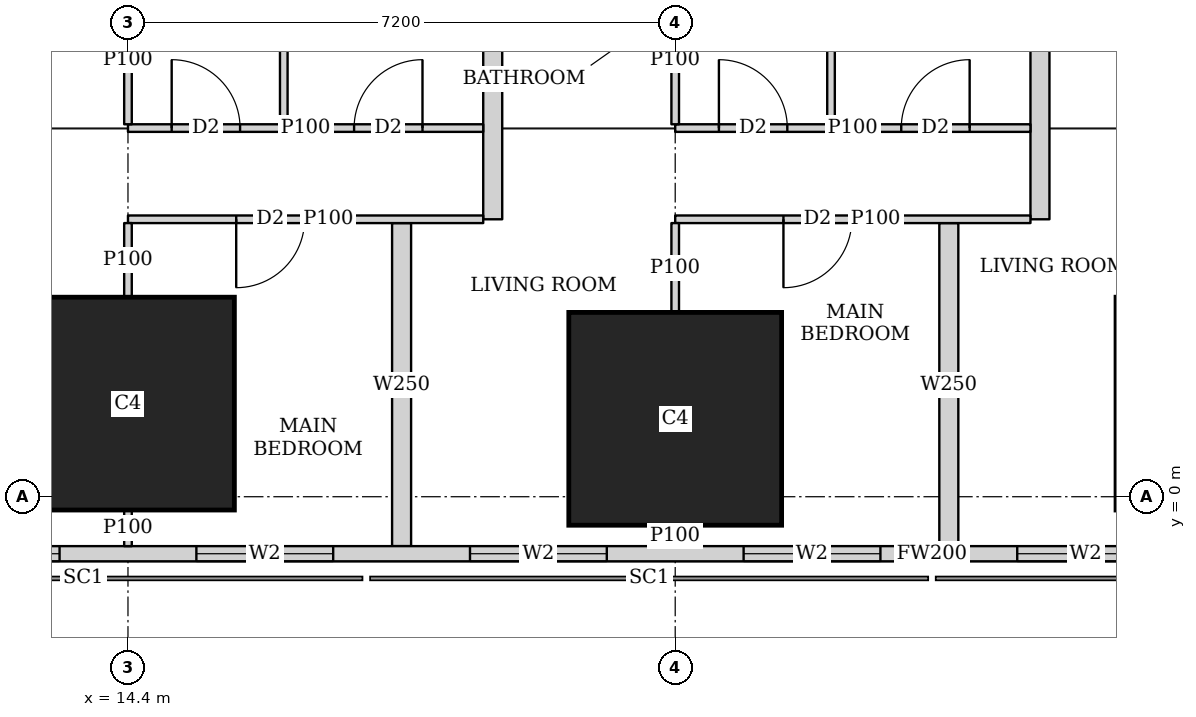
"""IFC4 building model, lengths in metres.
Left out: names, types, materials, properties, quantities, classifications, styles, units other than length and angle.
Written with IfcOpenShell. Run it as: python <this file> out.ifc"""

import sys

from ifc_helpers import new_model, si_unit, direction, frame, frame_2d, origin, origin_2d, place, context, subcontext, project, spatial, rectangle, extrude, element, fill, save


model = new_model("IFC4")
c1 = context("Model", 3, precision=1e-05, world=origin(), true_north=direction((0.0, 1.0)))
c2 = subcontext(c1, "Body", "Model", "MODEL_VIEW")
j1 = project(units=[si_unit("LENGTHUNIT", "METRE"), si_unit("PLANEANGLEUNIT", "RADIAN")], contexts=[c1])
p1 = place(None, origin())
s1 = spatial("IfcSite", under=j1, at=p1, CompositionType="ELEMENT")
p2 = place(p1, origin())
s2 = spatial("IfcBuilding", under=s1, at=p2, CompositionType="ELEMENT")
p3 = place(p2, frame((0.0, 0.0, 68.75)))
s3 = spatial("IfcBuildingStorey", under=s2, at=p3, CompositionType="ELEMENT", Elevation=68.75)
for number, where, z_axis, x_axis in (
    (1, (14.4, 1.225, 0.0), (0.0, 0.0, 1.0), (1.0, 0.0, 0.0)),
    (2, (21.6, 1.025, 0.0), (0.0, 0.0, 1.0), (1.0, 0.0, 0.0)),
):
    element("IfcColumn", number, at=place(p3, frame(where, z_axis=z_axis, x_axis=x_axis)), inside=s3, PredefinedType="COLUMN", context=c2, shape_type="SweptSolid", body=[
        extrude(rectangle(XDim=2.8, YDim=2.8, at=origin_2d()), origin(), (0.0, 0.0, 1.0), 3.75),
    ])
p4 = place(p3, frame((2.163, -0.75, 0.0), z_axis=(0.0, 0.0, 1.0), x_axis=(1.0, 0.0, 0.0)))
e3 = element("IfcWall", 3, at=p4, inside=s3, PredefinedType="SOLIDWALL", context=c2, shape_type="SweptSolid", body=[
    extrude(rectangle(XDim=45.628, YDim=0.2, at=frame_2d((22.814, 0.0))), origin(), (0.0, 0.0, 1.0), 3.45),
])
p5 = place(p4, frame((9.537, 0.0, 0.9)))
e4 = element("IfcOpeningElement", 4, at=p5, cuts=e3, PredefinedType="OPENING", context=c2, shape_type="SweptSolid", body=[
    extrude(rectangle(XDim=1.8, YDim=1.5, at=frame_2d((0.9, 0.75))), frame((0.0, 0.11, 0.0), z_axis=(0.0, -1.0, 0.0), x_axis=(1.0, 0.0, 0.0)), (0.0, 0.0, 1.0), 0.22),
])
p6 = place(p4, frame((13.137, 0.0, 0.9)))
e5 = element("IfcOpeningElement", 5, at=p6, cuts=e3, PredefinedType="OPENING", context=c2, shape_type="SweptSolid", body=[
    extrude(rectangle(XDim=1.8, YDim=1.5, at=frame_2d((0.9, 0.75))), frame((0.0, 0.11, 0.0), z_axis=(0.0, -1.0, 0.0), x_axis=(1.0, 0.0, 0.0)), (0.0, 0.0, 1.0), 0.22),
])
p7 = place(p4, frame((16.737, 0.0, 0.9)))
e6 = element("IfcOpeningElement", 6, at=p7, cuts=e3, PredefinedType="OPENING", context=c2, shape_type="SweptSolid", body=[
    extrude(rectangle(XDim=1.8, YDim=1.5, at=frame_2d((0.9, 0.75))), frame((0.0, 0.11, 0.0), z_axis=(0.0, -1.0, 0.0), x_axis=(1.0, 0.0, 0.0)), (0.0, 0.0, 1.0), 0.22),
])
p8 = place(p4, frame((20.337, 0.0, 0.9)))
e7 = element("IfcOpeningElement", 7, at=p8, cuts=e3, PredefinedType="OPENING", context=c2, shape_type="SweptSolid", body=[
    extrude(rectangle(XDim=1.8, YDim=1.5, at=frame_2d((0.9, 0.75))), frame((0.0, 0.11, 0.0), z_axis=(0.0, -1.0, 0.0), x_axis=(1.0, 0.0, 0.0)), (0.0, 0.0, 1.0), 0.22),
])
p9 = place(p4, frame((23.937, 0.0, 0.9)))
e8 = element("IfcOpeningElement", 8, at=p9, cuts=e3, PredefinedType="OPENING", context=c2, shape_type="SweptSolid", body=[
    extrude(rectangle(XDim=1.8, YDim=1.5, at=frame_2d((0.9, 0.75))), frame((0.0, 0.11, 0.0), z_axis=(0.0, -1.0, 0.0), x_axis=(1.0, 0.0, 0.0)), (0.0, 0.0, 1.0), 0.22),
])
p10 = place(p4, frame((27.537, 0.0, 0.9)))
e9 = element("IfcOpeningElement", 9, at=p10, cuts=e3, PredefinedType="OPENING", context=c2, shape_type="SweptSolid", body=[
    extrude(rectangle(XDim=1.8, YDim=1.5, at=frame_2d((0.9, 0.75))), frame((0.0, 0.11, 0.0), z_axis=(0.0, -1.0, 0.0), x_axis=(1.0, 0.0, 0.0)), (0.0, 0.0, 1.0), 0.22),
])
p11 = place(p4, frame((31.137, 0.0, 0.9)))
e10 = element("IfcOpeningElement", 10, at=p11, cuts=e3, PredefinedType="OPENING", context=c2, shape_type="SweptSolid", body=[
    extrude(rectangle(XDim=1.8, YDim=1.5, at=frame_2d((0.9, 0.75))), frame((0.0, 0.11, 0.0), z_axis=(0.0, -1.0, 0.0), x_axis=(1.0, 0.0, 0.0)), (0.0, 0.0, 1.0), 0.22),
])
p12 = place(p4, frame((34.737, 0.0, 0.9)))
e11 = element("IfcOpeningElement", 11, at=p12, cuts=e3, PredefinedType="OPENING", context=c2, shape_type="SweptSolid", body=[
    extrude(rectangle(XDim=1.8, YDim=1.5, at=frame_2d((0.9, 0.75))), frame((0.0, 0.11, 0.0), z_axis=(0.0, -1.0, 0.0), x_axis=(1.0, 0.0, 0.0)), (0.0, 0.0, 1.0), 0.22),
])
p13 = place(p3, frame((19.074, 3.65, 0.0), z_axis=(0.0, 0.0, 1.0), x_axis=(-1.0, 0.0, 0.0)))
e12 = element("IfcWall", 12, at=p13, inside=s3, PredefinedType="PARTITIONING", context=c2, shape_type="SweptSolid", body=[
    extrude(rectangle(XDim=4.674, YDim=0.1, at=frame_2d((2.337, 0.0))), origin(), (0.0, 0.0, 1.0), 3.45),
])
p14 = place(p13, frame((2.35, 0.0, 0.0)))
e13 = element("IfcOpeningElement", 13, at=p14, cuts=e12, PredefinedType="OPENING", context=c2, shape_type="SweptSolid", body=[
    extrude(rectangle(XDim=0.9, YDim=2.1, at=frame_2d((0.45, 1.05))), frame((0.0, 0.06, 0.0), z_axis=(0.0, -1.0, 0.0), x_axis=(1.0, 0.0, 0.0)), (0.0, 0.0, 1.0), 0.12),
])
p15 = place(p3, frame((19.074, 4.85, 0.0), z_axis=(0.0, 0.0, 1.0), x_axis=(-1.0, 0.0, 0.0)))
e14 = element("IfcWall", 14, at=p15, inside=s3, PredefinedType="PARTITIONING", context=c2, shape_type="SweptSolid", body=[
    extrude(rectangle(XDim=4.674, YDim=0.1, at=frame_2d((2.337, 0.0))), origin(), (0.0, 0.0, 1.0), 3.45),
])
p16 = place(p15, frame((3.199, 0.0, 0.0)))
e15 = element("IfcOpeningElement", 15, at=p16, cuts=e14, PredefinedType="OPENING", context=c2, shape_type="SweptSolid", body=[
    extrude(rectangle(XDim=0.9, YDim=2.1, at=frame_2d((0.45, 1.05))), frame((0.0, 0.06, 0.0), z_axis=(0.0, -1.0, 0.0), x_axis=(1.0, 0.0, 0.0)), (0.0, 0.0, 1.0), 0.12),
])
p17 = place(p15, frame((0.799, 0.0, 0.0)))
e16 = element("IfcOpeningElement", 16, at=p17, cuts=e14, PredefinedType="OPENING", context=c2, shape_type="SweptSolid", body=[
    extrude(rectangle(XDim=0.9, YDim=2.1, at=frame_2d((0.45, 1.05))), frame((0.0, 0.06, 0.0), z_axis=(0.0, -1.0, 0.0), x_axis=(1.0, 0.0, 0.0)), (0.0, 0.0, 1.0), 0.12),
])
p18 = place(p3, frame((14.4, -0.65, 0.0), z_axis=(0.0, 0.0, 1.0), x_axis=(0.0, 1.0, 0.0)))
e17 = element("IfcWall", 17, at=p18, inside=s3, PredefinedType="PARTITIONING", context=c2, shape_type="SweptSolid", body=[
    extrude(rectangle(XDim=0.474, YDim=0.1, at=frame_2d((0.237, 0.0))), origin(), (0.0, 0.0, 1.0), 3.45),
])
p19 = place(p3, frame((14.4, 2.626, 0.0), z_axis=(0.0, 0.0, 1.0), x_axis=(0.0, 1.0, 0.0)))
e18 = element("IfcWall", 18, at=p19, inside=s3, PredefinedType="PARTITIONING", context=c2, shape_type="SweptSolid", body=[
    extrude(rectangle(XDim=0.974, YDim=0.1, at=frame_2d((0.487, 0.0))), origin(), (0.0, 0.0, 1.0), 3.45),
])
p20 = place(p3, frame((14.4, 4.9, 0.0), z_axis=(0.0, 0.0, 1.0), x_axis=(0.0, 1.0, 0.0)))
e19 = element("IfcWall", 19, at=p20, inside=s3, PredefinedType="PARTITIONING", context=c2, shape_type="SweptSolid", body=[
    extrude(rectangle(XDim=1.699, YDim=0.1, at=frame_2d((0.85, 0.0))), origin(), (0.0, 0.0, 1.0), 3.45),
])
p21 = place(p3, frame((16.45, 4.9, 0.0), z_axis=(0.0, 0.0, 1.0), x_axis=(0.0, 1.0, 0.0)))
e20 = element("IfcWall", 20, at=p21, inside=s3, PredefinedType="PARTITIONING", context=c2, shape_type="SweptSolid", body=[
    extrude(rectangle(XDim=3.525, YDim=0.1, at=frame_2d((1.763, 0.0))), origin(), (0.0, 0.0, 1.0), 3.45),
])
p22 = place(p3, frame((26.274, 3.65, 0.0), z_axis=(0.0, 0.0, 1.0), x_axis=(-1.0, 0.0, 0.0)))
e21 = element("IfcWall", 21, at=p22, inside=s3, PredefinedType="PARTITIONING", context=c2, shape_type="SweptSolid", body=[
    extrude(rectangle(XDim=4.674, YDim=0.1, at=frame_2d((2.337, 0.0))), origin(), (0.0, 0.0, 1.0), 3.45),
])
p23 = place(p22, frame((2.35, 0.0, 0.0)))
e22 = element("IfcOpeningElement", 22, at=p23, cuts=e21, PredefinedType="OPENING", context=c2, shape_type="SweptSolid", body=[
    extrude(rectangle(XDim=0.9, YDim=2.1, at=frame_2d((0.45, 1.05))), frame((0.0, 0.06, 0.0), z_axis=(0.0, -1.0, 0.0), x_axis=(1.0, 0.0, 0.0)), (0.0, 0.0, 1.0), 0.12),
])
p24 = place(p3, frame((26.274, 4.85, 0.0), z_axis=(0.0, 0.0, 1.0), x_axis=(-1.0, 0.0, 0.0)))
e23 = element("IfcWall", 23, at=p24, inside=s3, PredefinedType="PARTITIONING", context=c2, shape_type="SweptSolid", body=[
    extrude(rectangle(XDim=4.674, YDim=0.1, at=frame_2d((2.337, 0.0))), origin(), (0.0, 0.0, 1.0), 3.45),
])
p25 = place(p24, frame((3.199, 0.0, 0.0)))
e24 = element("IfcOpeningElement", 24, at=p25, cuts=e23, PredefinedType="OPENING", context=c2, shape_type="SweptSolid", body=[
    extrude(rectangle(XDim=0.9, YDim=2.1, at=frame_2d((0.45, 1.05))), frame((0.0, 0.06, 0.0), z_axis=(0.0, -1.0, 0.0), x_axis=(1.0, 0.0, 0.0)), (0.0, 0.0, 1.0), 0.12),
])
p26 = place(p24, frame((0.8, 0.0, 0.0)))
e25 = element("IfcOpeningElement", 25, at=p26, cuts=e23, PredefinedType="OPENING", context=c2, shape_type="SweptSolid", body=[
    extrude(rectangle(XDim=0.9, YDim=2.1, at=frame_2d((0.45, 1.05))), frame((0.0, 0.06, 0.0), z_axis=(0.0, -1.0, 0.0), x_axis=(1.0, 0.0, 0.0)), (0.0, 0.0, 1.0), 0.12),
])
p27 = place(p3, frame((21.6, -0.65, 0.0), z_axis=(0.0, 0.0, 1.0), x_axis=(0.0, 1.0, 0.0)))
e26 = element("IfcWall", 26, at=p27, inside=s3, PredefinedType="PARTITIONING", context=c2, shape_type="SweptSolid", body=[
    extrude(rectangle(XDim=0.274, YDim=0.1, at=frame_2d((0.137, 0.0))), origin(), (0.0, 0.0, 1.0), 3.45),
])
p28 = place(p3, frame((21.6, 2.426, 0.0), z_axis=(0.0, 0.0, 1.0), x_axis=(0.0, 1.0, 0.0)))
e27 = element("IfcWall", 27, at=p28, inside=s3, PredefinedType="PARTITIONING", context=c2, shape_type="SweptSolid", body=[
    extrude(rectangle(XDim=1.174, YDim=0.1, at=frame_2d((0.587, 0.0))), origin(), (0.0, 0.0, 1.0), 3.45),
])
p29 = place(p3, frame((21.6, 4.9, 0.0), z_axis=(0.0, 0.0, 1.0), x_axis=(0.0, 1.0, 0.0)))
e28 = element("IfcWall", 28, at=p29, inside=s3, PredefinedType="PARTITIONING", context=c2, shape_type="SweptSolid", body=[
    extrude(rectangle(XDim=1.699, YDim=0.1, at=frame_2d((0.85, 0.0))), origin(), (0.0, 0.0, 1.0), 3.45),
])
p30 = place(p3, frame((23.65, 4.9, 0.0), z_axis=(0.0, 0.0, 1.0), x_axis=(0.0, 1.0, 0.0)))
e29 = element("IfcWall", 29, at=p30, inside=s3, PredefinedType="PARTITIONING", context=c2, shape_type="SweptSolid", body=[
    extrude(rectangle(XDim=3.525, YDim=0.1, at=frame_2d((1.763, 0.0))), origin(), (0.0, 0.0, 1.0), 3.45),
])
p31 = place(p3, frame((18.0, -0.65, 0.0), z_axis=(0.0, 0.0, 1.0), x_axis=(0.0, 1.0, 0.0)))
e30 = element("IfcWall", 30, at=p31, inside=s3, PredefinedType="SOLIDWALL", context=c2, shape_type="SweptSolid", body=[
    extrude(rectangle(XDim=4.25, YDim=0.25, at=frame_2d((2.125, 0.0))), origin(), (0.0, 0.0, 1.0), 2.0),
])
p32 = place(p3, frame((19.199, 3.65, 0.0), z_axis=(0.0, 0.0, 1.0), x_axis=(0.0, 1.0, 0.0)))
e31 = element("IfcWall", 31, at=p32, inside=s3, PredefinedType="SOLIDWALL", context=c2, shape_type="SweptSolid", body=[
    extrude(rectangle(XDim=4.775, YDim=0.25, at=frame_2d((2.388, 0.0))), origin(), (0.0, 0.0, 1.0), 3.45),
])
p33 = place(p3, frame((25.2, -0.65, 0.0), z_axis=(0.0, 0.0, 1.0), x_axis=(0.0, 1.0, 0.0)))
e32 = element("IfcWall", 32, at=p33, inside=s3, PredefinedType="SOLIDWALL", context=c2, shape_type="SweptSolid", body=[
    extrude(rectangle(XDim=4.25, YDim=0.25, at=frame_2d((2.125, 0.0))), origin(), (0.0, 0.0, 1.0), 2.0),
])
p34 = place(p3, frame((26.399, 3.65, 0.0), z_axis=(0.0, 0.0, 1.0), x_axis=(0.0, 1.0, 0.0)))
e33 = element("IfcWall", 33, at=p34, inside=s3, PredefinedType="SOLIDWALL", context=c2, shape_type="SweptSolid", body=[
    extrude(rectangle(XDim=4.775, YDim=0.25, at=frame_2d((2.388, 0.0))), origin(), (0.0, 0.0, 1.0), 3.45),
])
p35 = place(p5, origin())
e34 = element("IfcWindow", 34, at=p35, inside=s3, PartitioningType="SINGLE_PANEL", PredefinedType="WINDOW", context=c2, shape_type="SweptSolid", body=[
    extrude(rectangle(XDim=1.8, YDim=1.5, at=frame_2d((0.9, 0.75))), frame((0.0, 0.03, 0.0), z_axis=(0.0, -1.0, 0.0), x_axis=(1.0, 0.0, 0.0)), (0.0, 0.0, 1.0), 0.06),
])
fill(e4, e34)
p36 = place(p6, origin())
e35 = element("IfcWindow", 35, at=p36, inside=s3, PartitioningType="SINGLE_PANEL", PredefinedType="WINDOW", context=c2, shape_type="SweptSolid", body=[
    extrude(rectangle(XDim=1.8, YDim=1.5, at=frame_2d((0.9, 0.75))), frame((0.0, 0.03, 0.0), z_axis=(0.0, -1.0, 0.0), x_axis=(1.0, 0.0, 0.0)), (0.0, 0.0, 1.0), 0.06),
])
fill(e5, e35)
p37 = place(p7, origin())
e36 = element("IfcWindow", 36, at=p37, inside=s3, PartitioningType="SINGLE_PANEL", PredefinedType="WINDOW", context=c2, shape_type="SweptSolid", body=[
    extrude(rectangle(XDim=1.8, YDim=1.5, at=frame_2d((0.9, 0.75))), frame((0.0, 0.03, 0.0), z_axis=(0.0, -1.0, 0.0), x_axis=(1.0, 0.0, 0.0)), (0.0, 0.0, 1.0), 0.06),
])
fill(e6, e36)
p38 = place(p8, origin())
e37 = element("IfcWindow", 37, at=p38, inside=s3, PartitioningType="SINGLE_PANEL", PredefinedType="WINDOW", context=c2, shape_type="SweptSolid", body=[
    extrude(rectangle(XDim=1.8, YDim=1.5, at=frame_2d((0.9, 0.75))), frame((0.0, 0.03, 0.0), z_axis=(0.0, -1.0, 0.0), x_axis=(1.0, 0.0, 0.0)), (0.0, 0.0, 1.0), 0.06),
])
fill(e7, e37)
p39 = place(p9, origin())
e38 = element("IfcWindow", 38, at=p39, inside=s3, PartitioningType="SINGLE_PANEL", PredefinedType="WINDOW", context=c2, shape_type="SweptSolid", body=[
    extrude(rectangle(XDim=1.8, YDim=1.5, at=frame_2d((0.9, 0.75))), frame((0.0, 0.03, 0.0), z_axis=(0.0, -1.0, 0.0), x_axis=(1.0, 0.0, 0.0)), (0.0, 0.0, 1.0), 0.06),
])
fill(e8, e38)
p40 = place(p14, origin())
e39 = element("IfcDoor", 39, at=p40, inside=s3, OperationType="SINGLE_SWING_RIGHT", PredefinedType="DOOR", context=c2, shape_type="SweptSolid", body=[
    extrude(rectangle(XDim=0.9, YDim=2.1, at=frame_2d((0.45, 1.05))), frame((0.0, 0.025, 0.0), z_axis=(0.0, -1.0, 0.0), x_axis=(1.0, 0.0, 0.0)), (0.0, 0.0, 1.0), 0.05),
])
fill(e13, e39)
p41 = place(p16, origin())
e40 = element("IfcDoor", 40, at=p41, inside=s3, OperationType="SINGLE_SWING_LEFT", PredefinedType="DOOR", context=c2, shape_type="SweptSolid", body=[
    extrude(rectangle(XDim=0.9, YDim=2.1, at=frame_2d((0.45, 1.05))), frame((0.0, 0.025, 0.0), z_axis=(0.0, -1.0, 0.0), x_axis=(1.0, 0.0, 0.0)), (0.0, 0.0, 1.0), 0.05),
])
fill(e15, e40)
p42 = place(p17, origin())
e41 = element("IfcDoor", 41, at=p42, inside=s3, OperationType="SINGLE_SWING_RIGHT", PredefinedType="DOOR", context=c2, shape_type="SweptSolid", body=[
    extrude(rectangle(XDim=0.9, YDim=2.1, at=frame_2d((0.45, 1.05))), frame((0.0, 0.025, 0.0), z_axis=(0.0, -1.0, 0.0), x_axis=(1.0, 0.0, 0.0)), (0.0, 0.0, 1.0), 0.05),
])
fill(e16, e41)
p43 = place(p23, origin())
e42 = element("IfcDoor", 42, at=p43, inside=s3, OperationType="SINGLE_SWING_RIGHT", PredefinedType="DOOR", context=c2, shape_type="SweptSolid", body=[
    extrude(rectangle(XDim=0.9, YDim=2.1, at=frame_2d((0.45, 1.05))), frame((0.0, 0.025, 0.0), z_axis=(0.0, -1.0, 0.0), x_axis=(1.0, 0.0, 0.0)), (0.0, 0.0, 1.0), 0.05),
])
fill(e22, e42)
p44 = place(p25, origin())
e43 = element("IfcDoor", 43, at=p44, inside=s3, OperationType="SINGLE_SWING_LEFT", PredefinedType="DOOR", context=c2, shape_type="SweptSolid", body=[
    extrude(rectangle(XDim=0.9, YDim=2.1, at=frame_2d((0.45, 1.05))), frame((0.0, 0.025, 0.0), z_axis=(0.0, -1.0, 0.0), x_axis=(1.0, 0.0, 0.0)), (0.0, 0.0, 1.0), 0.05),
])
fill(e24, e43)
p45 = place(p26, origin())
e44 = element("IfcDoor", 44, at=p45, inside=s3, OperationType="SINGLE_SWING_RIGHT", PredefinedType="DOOR", context=c2, shape_type="SweptSolid", body=[
    extrude(rectangle(XDim=0.9, YDim=2.1, at=frame_2d((0.45, 1.05))), frame((0.0, 0.025, 0.0), z_axis=(0.0, -1.0, 0.0), x_axis=(1.0, 0.0, 0.0)), (0.0, 0.0, 1.0), 0.05),
])
fill(e25, e44)
save(model, sys.argv[1])
